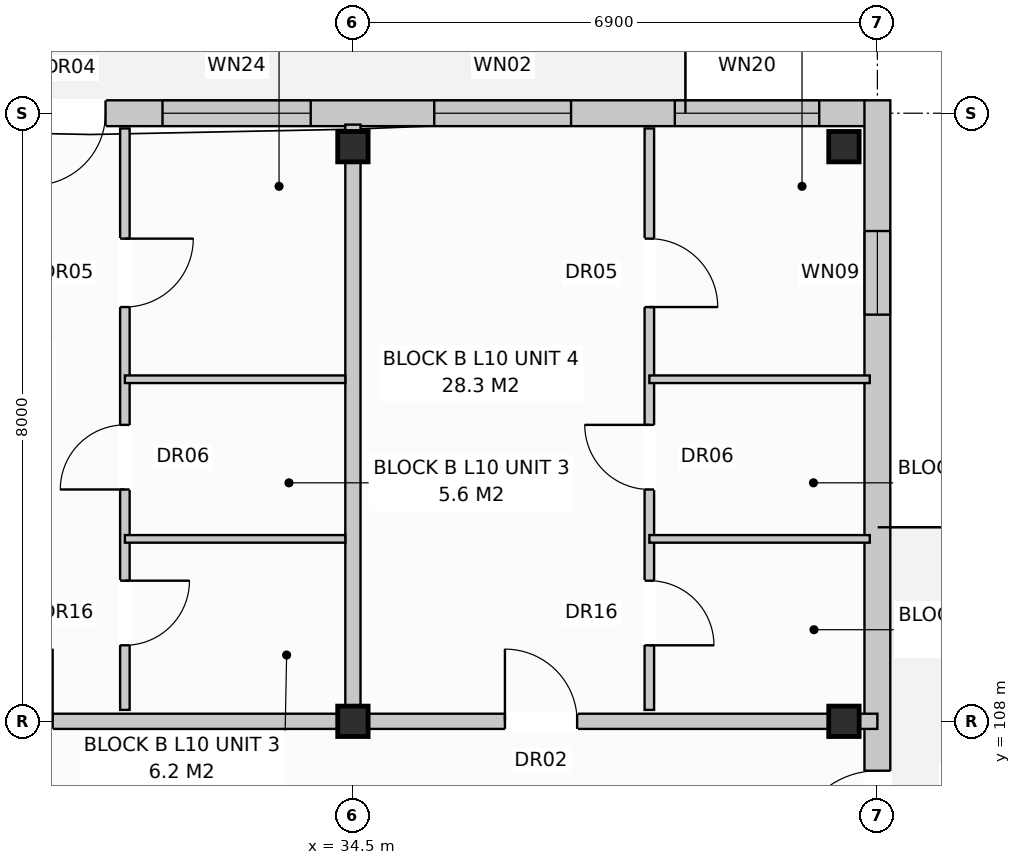
"""IFC4 building model, lengths in metres.
Left out: names, types, materials, properties, quantities, classifications, styles, units other than length and angle.
Written with IfcOpenShell. Run it as: python <this file> out.ifc"""

import sys

from ifc_helpers import new_model, si_unit, direction, frame, frame_2d, origin, origin_with_axes, origin_2d, place, context, subcontext, project, spatial, rectangle, extrude, element, fill, save


model = new_model("IFC4")
c1 = context("Model", 3, precision=1e-05, world=origin(), true_north=direction((0.0, 1.0)))
c2 = subcontext(c1, "Body", "Model", "MODEL_VIEW")
j1 = project(units=[si_unit("LENGTHUNIT", "METRE"), si_unit("PLANEANGLEUNIT", "RADIAN")], contexts=[c1])
p1 = place(None, origin())
s1 = spatial("IfcSite", under=j1, at=p1, CompositionType="ELEMENT")
p2 = place(p1, origin())
s2 = spatial("IfcBuilding", under=s1, at=p2, CompositionType="ELEMENT")
p3 = place(p2, frame((0.0, 0.0, 33.6)))
s3 = spatial("IfcBuildingStorey", under=s2, at=p3, CompositionType="ELEMENT", Elevation=33.6)
for number, where, z_axis, x_axis in (
    (1, (34.5, 108.0, 0.0), (0.0, 0.0, 1.0), (1.0, 0.0, 0.0)),
    (2, (34.5, 115.56, 0.0), (0.0, 0.0, 1.0), (1.0, 0.0, 0.0)),
    (3, (40.96, 108.0, 0.0), (0.0, 0.0, 1.0), (1.0, 0.0, 0.0)),
    (4, (40.96, 115.56, 0.0), (0.0, 0.0, 1.0), (1.0, 0.0, 0.0)),
):
    element("IfcColumn", number, at=place(p3, frame(where, z_axis=z_axis, x_axis=x_axis)), inside=s3, PredefinedType="COLUMN", context=c2, shape_type="SweptSolid", body=[
        extrude(rectangle(XDim=0.4, YDim=0.4, at=origin_2d()), origin(), (0.0, 0.0, 1.0), 3.2),
    ])
p4 = place(p3, frame((0.16, 116.0, 0.0), z_axis=(0.0, 0.0, 1.0), x_axis=(1.0, 0.0, 0.0)))
e5 = element("IfcWall", 5, at=p4, inside=s3, PredefinedType="STANDARD", context=c2, shape_type="SweptSolid", body=[
    extrude(rectangle(XDim=41.08, YDim=0.34, at=frame_2d((20.54, 0.0))), origin(), (0.0, 0.0, 1.0), 2.96),
])
p5 = place(p4, frame((2.835, 0.0, 0.0)))
e6 = element("IfcOpeningElement", 6, at=p5, cuts=e5, PredefinedType="OPENING", context=c2, shape_type="SweptSolid", body=[
    extrude(rectangle(XDim=0.95, YDim=2.1, at=frame_2d((0.475, 1.05))), frame((0.0, 0.182, 0.0), z_axis=(0.0, -1.0, 0.0), x_axis=(1.0, 0.0, 0.0)), (0.0, 0.0, 1.0), 0.364),
])
p6 = place(p4, frame((17.635, 0.0, 0.0)))
e7 = element("IfcOpeningElement", 7, at=p6, cuts=e5, PredefinedType="OPENING", context=c2, shape_type="SweptSolid", body=[
    extrude(rectangle(XDim=0.95, YDim=2.1, at=frame_2d((0.475, 1.05))), frame((0.0, 0.182, 0.0), z_axis=(0.0, -1.0, 0.0), x_axis=(1.0, 0.0, 0.0)), (0.0, 0.0, 1.0), 0.364),
])
p7 = place(p4, frame((30.135, 0.0, 0.0)))
e8 = element("IfcOpeningElement", 8, at=p7, cuts=e5, PredefinedType="OPENING", context=c2, shape_type="SweptSolid", body=[
    extrude(rectangle(XDim=0.95, YDim=2.1, at=frame_2d((0.475, 1.05))), frame((0.0, 0.182, 0.0), z_axis=(0.0, -1.0, 0.0), x_axis=(1.0, 0.0, 0.0)), (0.0, 0.0, 1.0), 0.364),
])
p8 = place(p4, frame((0.66, 0.0, 0.8)))
e9 = element("IfcOpeningElement", 9, at=p8, cuts=e5, PredefinedType="OPENING", context=c2, shape_type="SweptSolid", body=[
    extrude(rectangle(XDim=1.9, YDim=1.85, at=frame_2d((0.95, 0.925))), frame((0.0, 0.182, 0.0), z_axis=(0.0, -1.0, 0.0), x_axis=(1.0, 0.0, 0.0)), (0.0, 0.0, 1.0), 0.364),
])
p9 = place(p4, frame((4.335, 0.0, 0.8)))
e10 = element("IfcOpeningElement", 10, at=p9, cuts=e5, PredefinedType="OPENING", context=c2, shape_type="SweptSolid", body=[
    extrude(rectangle(XDim=1.95, YDim=1.65, at=frame_2d((0.975, 0.825))), frame((0.0, 0.182, 0.0), z_axis=(0.0, -1.0, 0.0), x_axis=(1.0, 0.0, 0.0)), (0.0, 0.0, 1.0), 0.364),
])
p10 = place(p4, frame((10.46, 0.0, 0.72)))
e11 = element("IfcOpeningElement", 11, at=p10, cuts=e5, PredefinedType="OPENING", context=c2, shape_type="SweptSolid", body=[
    extrude(rectangle(XDim=1.1, YDim=1.5, at=frame_2d((0.55, 0.75))), frame((0.0, 0.182, 0.0), z_axis=(0.0, -1.0, 0.0), x_axis=(1.0, 0.0, 0.0)), (0.0, 0.0, 1.0), 0.364),
])
p11 = place(p4, frame((15.76, 0.0, 0.72)))
e12 = element("IfcOpeningElement", 12, at=p11, cuts=e5, PredefinedType="OPENING", context=c2, shape_type="SweptSolid", body=[
    extrude(rectangle(XDim=1.1, YDim=1.5, at=frame_2d((0.55, 0.75))), frame((0.0, 0.182, 0.0), z_axis=(0.0, -1.0, 0.0), x_axis=(1.0, 0.0, 0.0)), (0.0, 0.0, 1.0), 0.364),
])
p12 = place(p4, frame((20.992, 0.0, 0.8)))
e13 = element("IfcOpeningElement", 13, at=p12, cuts=e5, PredefinedType="OPENING", context=c2, shape_type="SweptSolid", body=[
    extrude(rectangle(XDim=1.95, YDim=1.65, at=frame_2d((0.975, 0.825))), frame((0.0, 0.182, 0.0), z_axis=(0.0, -1.0, 0.0), x_axis=(1.0, 0.0, 0.0)), (0.0, 0.0, 1.0), 0.364),
])
p13 = place(p4, frame((24.66, 0.0, 0.72)))
e14 = element("IfcOpeningElement", 14, at=p13, cuts=e5, PredefinedType="OPENING", context=c2, shape_type="SweptSolid", body=[
    extrude(rectangle(XDim=1.1, YDim=1.5, at=frame_2d((0.55, 0.75))), frame((0.0, 0.182, 0.0), z_axis=(0.0, -1.0, 0.0), x_axis=(1.0, 0.0, 0.0)), (0.0, 0.0, 1.0), 0.364),
])
p14 = place(p4, frame((27.96, 0.0, 0.8)))
e15 = element("IfcOpeningElement", 15, at=p14, cuts=e5, PredefinedType="OPENING", context=c2, shape_type="SweptSolid", body=[
    extrude(rectangle(XDim=1.9, YDim=1.85, at=frame_2d((0.95, 0.925))), frame((0.0, 0.182, 0.0), z_axis=(0.0, -1.0, 0.0), x_axis=(1.0, 0.0, 0.0)), (0.0, 0.0, 1.0), 0.364),
])
p15 = place(p4, frame((31.835, 0.0, 0.8)))
e16 = element("IfcOpeningElement", 16, at=p15, cuts=e5, PredefinedType="OPENING", context=c2, shape_type="SweptSolid", body=[
    extrude(rectangle(XDim=1.95, YDim=1.65, at=frame_2d((0.975, 0.825))), frame((0.0, 0.182, 0.0), z_axis=(0.0, -1.0, 0.0), x_axis=(1.0, 0.0, 0.0)), (0.0, 0.0, 1.0), 0.364),
])
p16 = place(p4, frame((35.41, 0.0, 0.8)))
e17 = element("IfcOpeningElement", 17, at=p16, cuts=e5, PredefinedType="OPENING", context=c2, shape_type="SweptSolid", body=[
    extrude(rectangle(XDim=1.8, YDim=1.7, at=frame_2d((0.9, 0.85))), frame((0.0, 0.182, 0.0), z_axis=(0.0, -1.0, 0.0), x_axis=(1.0, 0.0, 0.0)), (0.0, 0.0, 1.0), 0.364),
])
p17 = place(p4, frame((38.575, 0.0, 0.8)))
e18 = element("IfcOpeningElement", 18, at=p17, cuts=e5, PredefinedType="OPENING", context=c2, shape_type="SweptSolid", body=[
    extrude(rectangle(XDim=1.9, YDim=1.85, at=frame_2d((0.95, 0.925))), frame((0.0, 0.182, 0.0), z_axis=(0.0, -1.0, 0.0), x_axis=(1.0, 0.0, 0.0)), (0.0, 0.0, 1.0), 0.364),
])
p18 = place(p3, frame((41.4, 97.43, 0.0), z_axis=(0.0, 0.0, 1.0), x_axis=(0.0, 1.0, 0.0)))
e19 = element("IfcWall", 19, at=p18, inside=s3, PredefinedType="STANDARD", context=c2, shape_type="SweptSolid", body=[
    extrude(rectangle(XDim=18.74, YDim=0.34, at=frame_2d((9.37, 0.0))), origin(), (0.0, 0.0, 1.0), 2.96),
])
p19 = place(p18, frame((8.82, 0.0, 0.0)))
e20 = element("IfcOpeningElement", 20, at=p19, cuts=e19, PredefinedType="OPENING", context=c2, shape_type="SweptSolid", body=[
    extrude(rectangle(XDim=1.1, YDim=2.1, at=frame_2d((0.55, 1.05))), frame((0.0, 0.182, 0.0), z_axis=(0.0, -1.0, 0.0), x_axis=(1.0, 0.0, 0.0)), (0.0, 0.0, 1.0), 0.364),
])
p20 = place(p18, frame((1.72, 0.0, 0.72)))
e21 = element("IfcOpeningElement", 21, at=p20, cuts=e19, PredefinedType="OPENING", context=c2, shape_type="SweptSolid", body=[
    extrude(rectangle(XDim=1.1, YDim=1.5, at=frame_2d((0.55, 0.75))), frame((0.0, 0.182, 0.0), z_axis=(0.0, -1.0, 0.0), x_axis=(1.0, 0.0, 0.0)), (0.0, 0.0, 1.0), 0.364),
])
p21 = place(p18, frame((15.92, 0.0, 0.72)))
e22 = element("IfcOpeningElement", 22, at=p21, cuts=e19, PredefinedType="OPENING", context=c2, shape_type="SweptSolid", body=[
    extrude(rectangle(XDim=1.1, YDim=1.5, at=frame_2d((0.55, 0.75))), frame((0.0, 0.182, 0.0), z_axis=(0.0, -1.0, 0.0), x_axis=(1.0, 0.0, 0.0)), (0.0, 0.0, 1.0), 0.364),
])
p22 = place(p3, frame((34.5, 108.15, 0.0), z_axis=(0.0, 0.0, 1.0), x_axis=(0.0, 1.0, 0.0)))
e23 = element("IfcWall", 23, at=p22, inside=s3, PredefinedType="PARTITIONING", context=c2, shape_type="SweptSolid", body=[
    extrude(rectangle(XDim=7.7, YDim=0.2, at=frame_2d((3.85, 0.0))), origin(), (0.0, 0.0, 1.0), 2.4),
])
p23 = place(p3, frame((27.6, 108.0, 0.0), z_axis=(0.0, 0.0, 1.0), x_axis=(1.0, 0.0, 0.0)))
e24 = element("IfcWall", 24, at=p23, inside=s3, PredefinedType="PARTITIONING", context=c2, shape_type="SweptSolid", body=[
    extrude(rectangle(XDim=6.9, YDim=0.2, at=frame_2d((3.45, 0.0))), origin(), (0.0, 0.0, 1.0), 2.4),
])
p24 = place(p23, frame((2.0, 0.0, 0.0)))
e25 = element("IfcOpeningElement", 25, at=p24, cuts=e24, PredefinedType="OPENING", context=c2, shape_type="SweptSolid", body=[
    extrude(rectangle(XDim=0.95, YDim=2.15, at=frame_2d((0.475, 1.075))), frame((0.0, 0.112, 0.0), z_axis=(0.0, -1.0, 0.0), x_axis=(1.0, 0.0, 0.0)), (0.0, 0.0, 1.0), 0.224),
])
p25 = place(p3, frame((31.5, 108.15, 0.0), z_axis=(0.0, 0.0, 1.0), x_axis=(0.0, 1.0, 0.0)))
e26 = element("IfcWall", 26, at=p25, inside=s3, PredefinedType="PARTITIONING", context=c2, shape_type="SweptSolid", body=[
    extrude(rectangle(XDim=7.65, YDim=0.125, at=frame_2d((3.825, 0.0))), origin(), (0.0, 0.0, 1.0), 2.96),
])
p26 = place(p25, frame((0.85, 0.0, 0.0)))
e27 = element("IfcOpeningElement", 27, at=p26, cuts=e26, PredefinedType="OPENING", context=c2, shape_type="SweptSolid", body=[
    extrude(rectangle(XDim=0.85, YDim=2.1, at=frame_2d((0.425, 1.05))), frame((0.0, 0.074, 0.0), z_axis=(0.0, -1.0, 0.0), x_axis=(1.0, 0.0, 0.0)), (0.0, 0.0, 1.0), 0.149),
])
p27 = place(p25, frame((2.9, 0.0, 0.0)))
e28 = element("IfcOpeningElement", 28, at=p27, cuts=e26, PredefinedType="OPENING", context=c2, shape_type="SweptSolid", body=[
    extrude(rectangle(XDim=0.85, YDim=2.05, at=frame_2d((0.425, 1.025))), frame((0.0, 0.074, 0.0), z_axis=(0.0, -1.0, 0.0), x_axis=(1.0, 0.0, 0.0)), (0.0, 0.0, 1.0), 0.149),
])
p28 = place(p25, frame((5.3, 0.0, 0.0)))
e29 = element("IfcOpeningElement", 29, at=p28, cuts=e26, PredefinedType="OPENING", context=c2, shape_type="SweptSolid", body=[
    extrude(rectangle(XDim=0.9, YDim=2.1, at=frame_2d((0.45, 1.05))), frame((0.0, 0.074, 0.0), z_axis=(0.0, -1.0, 0.0), x_axis=(1.0, 0.0, 0.0)), (0.0, 0.0, 1.0), 0.149),
])
for number, where, z_axis, x_axis in (
    (30, (31.5, 110.4, 0.0), (0.0, 0.0, 1.0), (1.0, 0.0, 0.0)),
    (31, (31.5, 112.5, 0.0), (0.0, 0.0, 1.0), (1.0, 0.0, 0.0)),
):
    element("IfcWall", number, at=place(p3, frame(where, z_axis=z_axis, x_axis=x_axis)), inside=s3, PredefinedType="PARTITIONING", context=c2, shape_type="SweptSolid", body=[
        extrude(rectangle(XDim=2.9, YDim=0.1, at=frame_2d((1.45, 0.0))), origin(), (0.0, 0.0, 1.0), 2.96),
    ])
p29 = place(p3, frame((34.5, 108.0, 0.0), z_axis=(0.0, 0.0, 1.0), x_axis=(1.0, 0.0, 0.0)))
e32 = element("IfcWall", 32, at=p29, inside=s3, PredefinedType="PARTITIONING", context=c2, shape_type="SweptSolid", body=[
    extrude(rectangle(XDim=6.9, YDim=0.2, at=frame_2d((3.45, 0.0))), origin(), (0.0, 0.0, 1.0), 2.4),
])
p30 = place(p29, frame((2.0, 0.0, 0.0)))
e33 = element("IfcOpeningElement", 33, at=p30, cuts=e32, PredefinedType="OPENING", context=c2, shape_type="SweptSolid", body=[
    extrude(rectangle(XDim=0.95, YDim=2.15, at=frame_2d((0.475, 1.075))), frame((0.0, 0.112, 0.0), z_axis=(0.0, -1.0, 0.0), x_axis=(1.0, 0.0, 0.0)), (0.0, 0.0, 1.0), 0.224),
])
p31 = place(p3, frame((38.4, 108.15, 0.0), z_axis=(0.0, 0.0, 1.0), x_axis=(0.0, 1.0, 0.0)))
e34 = element("IfcWall", 34, at=p31, inside=s3, PredefinedType="PARTITIONING", context=c2, shape_type="SweptSolid", body=[
    extrude(rectangle(XDim=7.65, YDim=0.125, at=frame_2d((3.825, 0.0))), origin(), (0.0, 0.0, 1.0), 2.96),
])
p32 = place(p31, frame((0.85, 0.0, 0.0)))
e35 = element("IfcOpeningElement", 35, at=p32, cuts=e34, PredefinedType="OPENING", context=c2, shape_type="SweptSolid", body=[
    extrude(rectangle(XDim=0.85, YDim=2.1, at=frame_2d((0.425, 1.05))), frame((0.0, 0.074, 0.0), z_axis=(0.0, -1.0, 0.0), x_axis=(1.0, 0.0, 0.0)), (0.0, 0.0, 1.0), 0.149),
])
p33 = place(p31, frame((2.9, 0.0, 0.0)))
e36 = element("IfcOpeningElement", 36, at=p33, cuts=e34, PredefinedType="OPENING", context=c2, shape_type="SweptSolid", body=[
    extrude(rectangle(XDim=0.85, YDim=2.05, at=frame_2d((0.425, 1.025))), frame((0.0, 0.074, 0.0), z_axis=(0.0, -1.0, 0.0), x_axis=(1.0, 0.0, 0.0)), (0.0, 0.0, 1.0), 0.149),
])
p34 = place(p31, frame((5.3, 0.0, 0.0)))
e37 = element("IfcOpeningElement", 37, at=p34, cuts=e34, PredefinedType="OPENING", context=c2, shape_type="SweptSolid", body=[
    extrude(rectangle(XDim=0.9, YDim=2.1, at=frame_2d((0.45, 1.05))), frame((0.0, 0.074, 0.0), z_axis=(0.0, -1.0, 0.0), x_axis=(1.0, 0.0, 0.0)), (0.0, 0.0, 1.0), 0.149),
])
for number, where, z_axis, x_axis in (
    (38, (38.4, 110.4, 0.0), (0.0, 0.0, 1.0), (1.0, 0.0, 0.0)),
    (39, (38.4, 112.5, 0.0), (0.0, 0.0, 1.0), (1.0, 0.0, 0.0)),
):
    element("IfcWall", number, at=place(p3, frame(where, z_axis=z_axis, x_axis=x_axis)), inside=s3, PredefinedType="PARTITIONING", context=c2, shape_type="SweptSolid", body=[
        extrude(rectangle(XDim=2.9, YDim=0.1, at=frame_2d((1.45, 0.0))), origin(), (0.0, 0.0, 1.0), 2.96),
    ])
p35 = place(p7, frame((0.95, 0.0, 0.0), z_axis=(0.0, 0.0, 1.0), x_axis=(-1.0, 0.0, 0.0)))
e40 = element("IfcDoor", 40, at=p35, inside=s3, OperationType="SINGLE_SWING_LEFT", PredefinedType="DOOR", context=c2, shape_type="SweptSolid", body=[
    extrude(rectangle(XDim=0.95, YDim=2.1, at=frame_2d((0.475, 1.05))), frame((0.0, 0.025, 0.0), z_axis=(0.0, -1.0, 0.0), x_axis=(1.0, 0.0, 0.0)), (0.0, 0.0, 1.0), 0.05),
])
fill(e8, e40)
p36 = place(p15, origin_with_axes())
e41 = element("IfcWindow", 41, at=p36, inside=s3, PartitioningType="SINGLE_PANEL", PredefinedType="WINDOW", context=c2, shape_type="SweptSolid", body=[
    extrude(rectangle(XDim=1.95, YDim=1.65, at=frame_2d((0.975, 0.825))), frame((0.0, 0.03, 0.0), z_axis=(0.0, -1.0, 0.0), x_axis=(1.0, 0.0, 0.0)), (0.0, 0.0, 1.0), 0.06),
])
fill(e16, e41)
p37 = place(p16, origin_with_axes())
e42 = element("IfcWindow", 42, at=p37, inside=s3, PartitioningType="SINGLE_PANEL", PredefinedType="WINDOW", context=c2, shape_type="SweptSolid", body=[
    extrude(rectangle(XDim=1.8, YDim=1.7, at=frame_2d((0.9, 0.85))), frame((0.0, 0.03, 0.0), z_axis=(0.0, -1.0, 0.0), x_axis=(1.0, 0.0, 0.0)), (0.0, 0.0, 1.0), 0.06),
])
fill(e17, e42)
p38 = place(p17, origin_with_axes())
e43 = element("IfcWindow", 43, at=p38, inside=s3, PartitioningType="SINGLE_PANEL", PredefinedType="WINDOW", context=c2, shape_type="SweptSolid", body=[
    extrude(rectangle(XDim=1.9, YDim=1.85, at=frame_2d((0.95, 0.925))), frame((0.0, 0.03, 0.0), z_axis=(0.0, -1.0, 0.0), x_axis=(1.0, 0.0, 0.0)), (0.0, 0.0, 1.0), 0.06),
])
fill(e18, e43)
p39 = place(p19, origin_with_axes())
e44 = element("IfcDoor", 44, at=p39, inside=s3, OperationType="SINGLE_SWING_LEFT", PredefinedType="DOOR", context=c2, shape_type="SweptSolid", body=[
    extrude(rectangle(XDim=1.1, YDim=2.1, at=frame_2d((0.55, 1.05))), frame((0.0, 0.025, 0.0), z_axis=(0.0, -1.0, 0.0), x_axis=(1.0, 0.0, 0.0)), (0.0, 0.0, 1.0), 0.05),
])
fill(e20, e44)
p40 = place(p21, origin_with_axes())
e45 = element("IfcWindow", 45, at=p40, inside=s3, PartitioningType="SINGLE_PANEL", PredefinedType="WINDOW", context=c2, shape_type="SweptSolid", body=[
    extrude(rectangle(XDim=1.1, YDim=1.5, at=frame_2d((0.55, 0.75))), frame((0.0, 0.03, 0.0), z_axis=(0.0, -1.0, 0.0), x_axis=(1.0, 0.0, 0.0)), (0.0, 0.0, 1.0), 0.06),
])
fill(e22, e45)
p41 = place(p24, origin_with_axes())
e46 = element("IfcDoor", 46, at=p41, inside=s3, OperationType="SINGLE_SWING_RIGHT", PredefinedType="DOOR", context=c2, shape_type="SweptSolid", body=[
    extrude(rectangle(XDim=0.95, YDim=2.15, at=frame_2d((0.475, 1.075))), frame((0.0, 0.025, 0.0), z_axis=(0.0, -1.0, 0.0), x_axis=(1.0, 0.0, 0.0)), (0.0, 0.0, 1.0), 0.05),
])
fill(e25, e46)
p42 = place(p26, frame((0.85, 0.0, 0.0), z_axis=(0.0, 0.0, 1.0), x_axis=(-1.0, 0.0, 0.0)))
e47 = element("IfcDoor", 47, at=p42, inside=s3, OperationType="SINGLE_SWING_RIGHT", PredefinedType="DOOR", context=c2, shape_type="SweptSolid", body=[
    extrude(rectangle(XDim=0.85, YDim=2.1, at=frame_2d((0.425, 1.05))), frame((0.0, 0.025, 0.0), z_axis=(0.0, -1.0, 0.0), x_axis=(1.0, 0.0, 0.0)), (0.0, 0.0, 1.0), 0.05),
])
fill(e27, e47)
p43 = place(p27, origin_with_axes())
e48 = element("IfcDoor", 48, at=p43, inside=s3, OperationType="SINGLE_SWING_LEFT", PredefinedType="DOOR", context=c2, shape_type="SweptSolid", body=[
    extrude(rectangle(XDim=0.85, YDim=2.05, at=frame_2d((0.425, 1.025))), frame((0.0, 0.025, 0.0), z_axis=(0.0, -1.0, 0.0), x_axis=(1.0, 0.0, 0.0)), (0.0, 0.0, 1.0), 0.05),
])
fill(e28, e48)
p44 = place(p28, frame((0.9, 0.0, 0.0), z_axis=(0.0, 0.0, 1.0), x_axis=(-1.0, 0.0, 0.0)))
e49 = element("IfcDoor", 49, at=p44, inside=s3, OperationType="SINGLE_SWING_RIGHT", PredefinedType="DOOR", context=c2, shape_type="SweptSolid", body=[
    extrude(rectangle(XDim=0.9, YDim=2.1, at=frame_2d((0.45, 1.05))), frame((0.0, 0.025, 0.0), z_axis=(0.0, -1.0, 0.0), x_axis=(1.0, 0.0, 0.0)), (0.0, 0.0, 1.0), 0.05),
])
fill(e29, e49)
p45 = place(p30, origin_with_axes())
e50 = element("IfcDoor", 50, at=p45, inside=s3, OperationType="SINGLE_SWING_LEFT", PredefinedType="DOOR", context=c2, shape_type="SweptSolid", body=[
    extrude(rectangle(XDim=0.95, YDim=2.15, at=frame_2d((0.475, 1.075))), frame((0.0, 0.025, 0.0), z_axis=(0.0, -1.0, 0.0), x_axis=(1.0, 0.0, 0.0)), (0.0, 0.0, 1.0), 0.05),
])
fill(e33, e50)
p46 = place(p32, frame((0.85, 0.0, 0.0), z_axis=(0.0, 0.0, 1.0), x_axis=(-1.0, 0.0, 0.0)))
e51 = element("IfcDoor", 51, at=p46, inside=s3, OperationType="SINGLE_SWING_LEFT", PredefinedType="DOOR", context=c2, shape_type="SweptSolid", body=[
    extrude(rectangle(XDim=0.85, YDim=2.1, at=frame_2d((0.425, 1.05))), frame((0.0, 0.025, 0.0), z_axis=(0.0, -1.0, 0.0), x_axis=(1.0, 0.0, 0.0)), (0.0, 0.0, 1.0), 0.05),
])
fill(e35, e51)
p47 = place(p33, origin_with_axes())
e52 = element("IfcDoor", 52, at=p47, inside=s3, OperationType="SINGLE_SWING_RIGHT", PredefinedType="DOOR", context=c2, shape_type="SweptSolid", body=[
    extrude(rectangle(XDim=0.85, YDim=2.05, at=frame_2d((0.425, 1.025))), frame((0.0, 0.025, 0.0), z_axis=(0.0, -1.0, 0.0), x_axis=(1.0, 0.0, 0.0)), (0.0, 0.0, 1.0), 0.05),
])
fill(e36, e52)
p48 = place(p34, frame((0.9, 0.0, 0.0), z_axis=(0.0, 0.0, 1.0), x_axis=(-1.0, 0.0, 0.0)))
e53 = element("IfcDoor", 53, at=p48, inside=s3, OperationType="SINGLE_SWING_LEFT", PredefinedType="DOOR", context=c2, shape_type="SweptSolid", body=[
    extrude(rectangle(XDim=0.9, YDim=2.1, at=frame_2d((0.45, 1.05))), frame((0.0, 0.025, 0.0), z_axis=(0.0, -1.0, 0.0), x_axis=(1.0, 0.0, 0.0)), (0.0, 0.0, 1.0), 0.05),
])
fill(e37, e53)
save(model, sys.argv[1])
